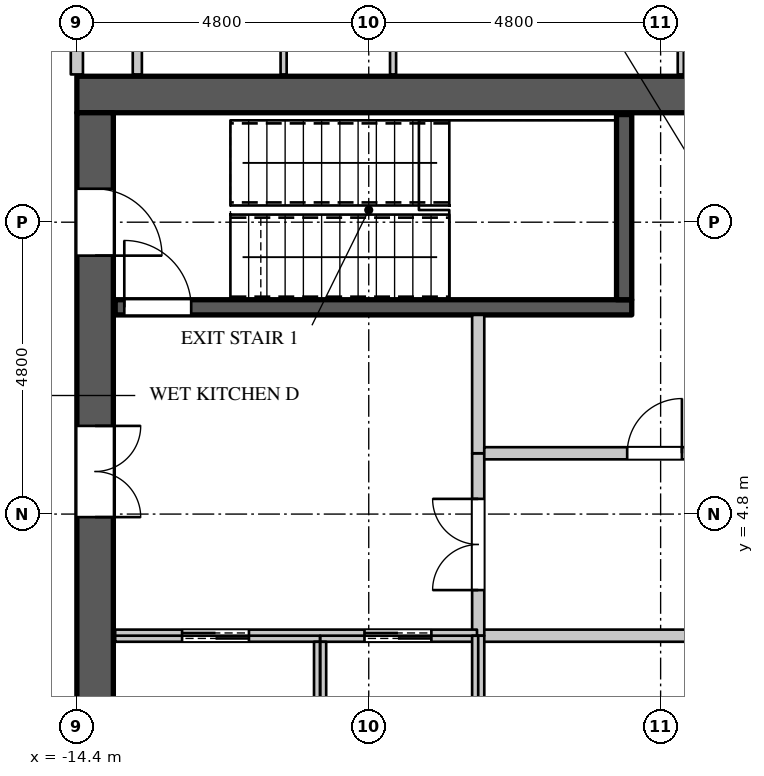
"""IFC4 building model, lengths in metres.
Left out: names, types, materials, properties, quantities, classifications, styles, units other than length and angle.
Written with IfcOpenShell. Run it as: python <this file> out.ifc"""

import sys

from ifc_helpers import new_model, si_unit, direction, frame, frame_2d, origin, place, context, subcontext, project, spatial, rectangle, extrude, element, fill, save


model = new_model("IFC4")
c1 = context("Model", 3, precision=1e-05, world=origin(), true_north=direction((0.0, 1.0)))
c2 = subcontext(c1, "Body", "Model", "MODEL_VIEW")
j1 = project(units=[si_unit("LENGTHUNIT", "METRE"), si_unit("PLANEANGLEUNIT", "RADIAN")], contexts=[c1])
p1 = place(None, origin())
s1 = spatial("IfcSite", under=j1, at=p1, CompositionType="ELEMENT")
p2 = place(p1, origin())
s2 = spatial("IfcBuilding", under=s1, at=p2, CompositionType="ELEMENT")
p3 = place(p2, frame((0.0, 0.0, 281.1)))
s3 = spatial("IfcBuildingStorey", under=s2, at=p3, CompositionType="ELEMENT", Elevation=281.1)
p4 = place(p3, frame((-14.4, 11.7, 0.0), z_axis=(0.0, 0.0, 1.0), x_axis=(1.0, 0.0, 0.0)))
e1 = element("IfcWall", 1, at=p4, inside=s3, PredefinedType="SHEAR", context=c2, shape_type="SweptSolid", body=[
    extrude(rectangle(XDim=28.8, YDim=0.6, at=frame_2d((14.4, 0.0))), origin(), (0.0, 0.0, 1.0), 4.2),
])
p5 = place(p3, frame((-14.1, -11.4, 0.0), z_axis=(0.0, 0.0, 1.0), x_axis=(0.0, 1.0, 0.0)))
e2 = element("IfcWall", 2, at=p5, inside=s3, PredefinedType="SHEAR", context=c2, shape_type="SweptSolid", body=[
    extrude(rectangle(XDim=22.8, YDim=0.6, at=frame_2d((11.4, 0.0))), origin(), (0.0, 0.0, 1.0), 4.2),
])
p6 = place(p5, frame((20.45, 0.0, 0.0)))
e3 = element("IfcOpeningElement", 3, at=p6, cuts=e2, PredefinedType="OPENING", context=c2, shape_type="SweptSolid", body=[
    extrude(rectangle(XDim=1.1, YDim=2.2, at=frame_2d((0.55, 1.1))), frame((0.0, 0.31, 0.0), z_axis=(0.0, -1.0, 0.0), x_axis=(1.0, 0.0, 0.0)), (0.0, 0.0, 1.0), 0.62),
])
p7 = place(p5, frame((1.25, 0.0, 0.0)))
e4 = element("IfcOpeningElement", 4, at=p7, cuts=e2, PredefinedType="OPENING", context=c2, shape_type="SweptSolid", body=[
    extrude(rectangle(XDim=1.1, YDim=2.2, at=frame_2d((0.55, 1.1))), frame((0.0, 0.31, 0.0), z_axis=(0.0, -1.0, 0.0), x_axis=(1.0, 0.0, 0.0)), (0.0, 0.0, 1.0), 0.62),
])
p8 = place(p5, frame((16.15, 0.0, 0.0)))
e5 = element("IfcOpeningElement", 5, at=p8, cuts=e2, PredefinedType="OPENING", context=c2, shape_type="SweptSolid", body=[
    extrude(rectangle(XDim=1.5, YDim=2.4, at=frame_2d((0.75, 1.2))), frame((0.0, 0.31, 0.0), z_axis=(0.0, -1.0, 0.0), x_axis=(1.0, 0.0, 0.0)), (0.0, 0.0, 1.0), 0.62),
])
p9 = place(p5, frame((5.15, 0.0, 0.0)))
e6 = element("IfcOpeningElement", 6, at=p9, cuts=e2, PredefinedType="OPENING", context=c2, shape_type="SweptSolid", body=[
    extrude(rectangle(XDim=1.5, YDim=2.4, at=frame_2d((0.75, 1.2))), frame((0.0, 0.31, 0.0), z_axis=(0.0, -1.0, 0.0), x_axis=(1.0, 0.0, 0.0)), (0.0, 0.0, 1.0), 0.62),
])
p10 = place(p3, frame((-14.4, 12.03, 0.0), z_axis=(0.0, 0.0, 1.0), x_axis=(0.0, 1.0, 0.0)))
e7 = element("IfcWall", 7, at=p10, inside=s3, PredefinedType="PARTITIONING", context=c2, shape_type="SweptSolid", body=[
    extrude(rectangle(XDim=2.27, YDim=0.2, at=frame_2d((1.135, 0.0))), origin(), (0.0, 0.0, 1.0), 3.95),
])
p11 = place(p3, frame((-7.82, 2.8, 0.0), z_axis=(0.0, 0.0, 1.0), x_axis=(1.0, 0.0, 0.0)))
e8 = element("IfcWall", 8, at=p11, inside=s3, PredefinedType="PARTITIONING", context=c2, shape_type="SweptSolid", body=[
    extrude(rectangle(XDim=18.24, YDim=0.2, at=frame_2d((9.12, 0.0))), origin(), (0.0, 0.0, 1.0), 3.95),
])
p12 = place(p11, frame((3.75, 0.0, 0.0)))
e9 = element("IfcOpeningElement", 9, at=p12, cuts=e8, PredefinedType="OPENING", context=c2, shape_type="SweptSolid", body=[
    extrude(rectangle(XDim=0.9, YDim=2.2, at=frame_2d((0.45, 1.1))), frame((0.0, 0.11, 0.0), z_axis=(0.0, -1.0, 0.0), x_axis=(1.0, 0.0, 0.0)), (0.0, 0.0, 1.0), 0.22),
])
p13 = place(p11, frame((12.7, 0.0, 0.0)))
e10 = element("IfcOpeningElement", 10, at=p13, cuts=e8, PredefinedType="OPENING", context=c2, shape_type="SweptSolid", body=[
    extrude(rectangle(XDim=0.9, YDim=2.2, at=frame_2d((0.45, 1.1))), frame((0.0, 0.11, 0.0), z_axis=(0.0, -1.0, 0.0), x_axis=(1.0, 0.0, 0.0)), (0.0, 0.0, 1.0), 0.22),
])
p14 = place(p3, frame((-7.8, 2.8, 0.0), z_axis=(0.0, 0.0, 1.0), x_axis=(0.0, 1.0, 0.0)))
e11 = element("IfcWall", 11, at=p14, inside=s3, PredefinedType="PARTITIONING", context=c2, shape_type="SweptSolid", body=[
    extrude(rectangle(XDim=3.0, YDim=0.2, at=frame_2d((1.5, 0.0))), origin(), (0.0, 0.0, 1.0), 3.95),
])
p15 = place(p14, frame((0.75, 0.0, 0.0)))
e12 = element("IfcOpeningElement", 12, at=p15, cuts=e11, PredefinedType="OPENING", context=c2, shape_type="SweptSolid", body=[
    extrude(rectangle(XDim=1.5, YDim=2.4, at=frame_2d((0.75, 1.2))), frame((0.0, 0.11, 0.0), z_axis=(0.0, -1.0, 0.0), x_axis=(1.0, 0.0, 0.0)), (0.0, 0.0, 1.0), 0.22),
])
p16 = place(p3, frame((-13.406, 12.03, 0.0), z_axis=(0.0, 0.0, 1.0), x_axis=(0.0, 1.0, 0.0)))
e13 = element("IfcWall", 13, at=p16, inside=s3, PredefinedType="PARTITIONING", context=c2, shape_type="SweptSolid", body=[
    extrude(rectangle(XDim=13.701, YDim=0.15, at=frame_2d((6.851, 0.0))), origin(), (0.0, 0.0, 1.0), 3.3),
])
p17 = place(p16, frame((2.5, 0.0, 0.0)))
e14 = element("IfcOpeningElement", 14, at=p17, cuts=e13, PredefinedType="OPENING", context=c2, shape_type="SweptSolid", body=[
    extrude(rectangle(XDim=1.5, YDim=2.2, at=frame_2d((0.75, 1.1))), frame((0.0, 0.085, 0.0), z_axis=(0.0, -1.0, 0.0), x_axis=(1.0, 0.0, 0.0)), (0.0, 0.0, 1.0), 0.17),
])
p18 = place(p3, frame((-7.8, 5.8, 0.0), z_axis=(0.0, 0.0, 1.0), x_axis=(0.0, 1.0, 0.0)))
e15 = element("IfcWall", 15, at=p18, inside=s3, PredefinedType="PARTITIONING", context=c2, shape_type="SweptSolid", body=[
    extrude(rectangle(XDim=2.275, YDim=0.2, at=frame_2d((1.137, 0.0))), origin(), (0.0, 0.0, 1.0), 3.95),
])
p19 = place(p3, frame((-7.7, 5.8, 0.0), z_axis=(0.0, 0.0, 1.0), x_axis=(1.0, 0.0, 0.0)))
e16 = element("IfcWall", 16, at=p19, inside=s3, PredefinedType="PARTITIONING", context=c2, shape_type="SweptSolid", body=[
    extrude(rectangle(XDim=12.52, YDim=0.2, at=frame_2d((6.26, 0.0))), origin(), (0.0, 0.0, 1.0), 3.95),
])
p20 = place(p19, frame((2.35, 0.0, 0.0)))
e17 = element("IfcOpeningElement", 17, at=p20, cuts=e16, PredefinedType="OPENING", context=c2, shape_type="SweptSolid", body=[
    extrude(rectangle(XDim=0.9, YDim=2.2, at=frame_2d((0.45, 1.1))), frame((0.0, 0.11, 0.0), z_axis=(0.0, -1.0, 0.0), x_axis=(1.0, 0.0, 0.0)), (0.0, 0.0, 1.0), 0.22),
])
p21 = place(p19, frame((8.5, 0.0, 0.0)))
e18 = element("IfcOpeningElement", 18, at=p21, cuts=e16, PredefinedType="OPENING", context=c2, shape_type="SweptSolid", body=[
    extrude(rectangle(XDim=0.9, YDim=2.2, at=frame_2d((0.45, 1.1))), frame((0.0, 0.11, 0.0), z_axis=(0.0, -1.0, 0.0), x_axis=(1.0, 0.0, 0.0)), (0.0, 0.0, 1.0), 0.22),
])
p22 = place(p3, frame((-13.77, 2.8, 0.0), z_axis=(0.0, 0.0, 1.0), x_axis=(1.0, 0.0, 0.0)))
e19 = element("IfcWall", 19, at=p22, inside=s3, PredefinedType="PARTITIONING", context=c2, shape_type="SweptSolid", body=[
    extrude(rectangle(XDim=5.95, YDim=0.2, at=frame_2d((2.975, 0.0))), origin(), (0.0, 0.0, 1.0), 3.95),
])
p23 = place(p22, frame((1.1, 0.0, 0.0)))
e20 = element("IfcOpeningElement", 20, at=p23, cuts=e19, PredefinedType="OPENING", context=c2, shape_type="SweptSolid", body=[
    extrude(rectangle(XDim=1.1, YDim=2.2, at=frame_2d((0.55, 1.1))), frame((0.0, 0.11, 0.0), z_axis=(0.0, -1.0, 0.0), x_axis=(1.0, 0.0, 0.0)), (0.0, 0.0, 1.0), 0.22),
])
p24 = place(p22, frame((4.1, 0.0, 0.0)))
e21 = element("IfcOpeningElement", 21, at=p24, cuts=e19, PredefinedType="OPENING", context=c2, shape_type="SweptSolid", body=[
    extrude(rectangle(XDim=1.1, YDim=2.2, at=frame_2d((0.55, 1.1))), frame((0.0, 0.11, 0.0), z_axis=(0.0, -1.0, 0.0), x_axis=(1.0, 0.0, 0.0)), (0.0, 0.0, 1.0), 0.22),
])
p25 = place(p3, frame((-10.4, 0.0, 0.0), z_axis=(0.0, 0.0, 1.0), x_axis=(0.0, 1.0, 0.0)))
e22 = element("IfcWall", 22, at=p25, inside=s3, PredefinedType="PARTITIONING", context=c2, shape_type="SweptSolid", body=[
    extrude(rectangle(XDim=2.7, YDim=0.2, at=frame_2d((1.35, 0.0))), origin(), (0.0, 0.0, 1.0), 3.95),
])
p26 = place(p3, frame((-7.8, 0.0, 0.0), z_axis=(0.0, 0.0, 1.0), x_axis=(0.0, 1.0, 0.0)))
e23 = element("IfcWall", 23, at=p26, inside=s3, PredefinedType="PARTITIONING", context=c2, shape_type="SweptSolid", body=[
    extrude(rectangle(XDim=2.8, YDim=0.2, at=frame_2d((1.4, 0.0))), origin(), (0.0, 0.0, 1.0), 3.95),
])
p27 = place(p3, frame((-13.77, 8.2, 0.0), z_axis=(0.0, 0.0, 1.0), x_axis=(1.0, 0.0, 0.0)))
e24 = element("IfcWall", 24, at=p27, inside=s3, PredefinedType="SHEAR", context=c2, shape_type="SweptSolid", body=[
    extrude(rectangle(XDim=8.495, YDim=0.25, at=frame_2d((4.248, 0.0))), origin(), (0.0, 0.0, 1.0), 3.95),
])
p28 = place(p27, frame((0.15, 0.0, 0.0)))
e25 = element("IfcOpeningElement", 25, at=p28, cuts=e24, PredefinedType="OPENING", context=c2, shape_type="SweptSolid", body=[
    extrude(rectangle(XDim=1.1, YDim=2.2, at=frame_2d((0.55, 1.1))), frame((0.0, 0.135, 0.0), z_axis=(0.0, -1.0, 0.0), x_axis=(1.0, 0.0, 0.0)), (0.0, 0.0, 1.0), 0.27),
])
p29 = place(p3, frame((-5.4, 8.325, 0.0), z_axis=(0.0, 0.0, 1.0), x_axis=(0.0, 1.0, 0.0)))
e26 = element("IfcWall", 26, at=p29, inside=s3, PredefinedType="SHEAR", context=c2, shape_type="SweptSolid", body=[
    extrude(rectangle(XDim=3.045, YDim=0.25, at=frame_2d((1.522, 0.0))), origin(), (0.0, 0.0, 1.0), 3.95),
])
p30 = place(p3, frame((-11.0, 12.03, 0.0), z_axis=(0.0, 0.0, 1.0), x_axis=(0.0, 1.0, 0.0)))
e27 = element("IfcWall", 27, at=p30, inside=s3, PredefinedType="PARTITIONING", context=c2, shape_type="SweptSolid", body=[
    extrude(rectangle(XDim=6.795, YDim=0.1, at=frame_2d((3.397, 0.0))), origin(), (0.0, 0.0, 1.0), 3.95),
])
p31 = place(p30, frame((2.95, 0.0, 0.0)))
e28 = element("IfcOpeningElement", 28, at=p31, cuts=e27, PredefinedType="OPENING", context=c2, shape_type="SweptSolid", body=[
    extrude(rectangle(XDim=0.9, YDim=2.2, at=frame_2d((0.45, 1.1))), frame((0.0, 0.06, 0.0), z_axis=(0.0, -1.0, 0.0), x_axis=(1.0, 0.0, 0.0)), (0.0, 0.0, 1.0), 0.12),
])
p32 = place(p3, frame((-9.2, 12.03, 0.0), z_axis=(0.0, 0.0, 1.0), x_axis=(0.0, 1.0, 0.0)))
e29 = element("IfcWall", 29, at=p32, inside=s3, PredefinedType="PARTITIONING", context=c2, shape_type="SweptSolid", body=[
    extrude(rectangle(XDim=6.795, YDim=0.1, at=frame_2d((3.397, 0.0))), origin(), (0.0, 0.0, 1.0), 3.95),
])
p33 = place(p3, frame((-4.469, 12.03, 0.0), z_axis=(0.0, 0.0, 1.0), x_axis=(0.0, 1.0, 0.0)))
e30 = element("IfcWall", 30, at=p33, inside=s3, PredefinedType="PARTITIONING", context=c2, shape_type="SweptSolid", body=[
    extrude(rectangle(XDim=6.35, YDim=0.1, at=frame_2d((3.175, 0.0))), origin(), (0.0, 0.0, 1.0), 3.3),
])
p34 = place(p20, origin())
e31 = element("IfcDoor", 31, at=p34, inside=s3, OperationType="SINGLE_SWING_RIGHT", PredefinedType="DOOR", context=c2, shape_type="SweptSolid", body=[
    extrude(rectangle(XDim=0.9, YDim=2.2, at=frame_2d((0.45, 1.1))), frame((0.0, 0.025, 0.0), z_axis=(0.0, -1.0, 0.0), x_axis=(1.0, 0.0, 0.0)), (0.0, 0.0, 1.0), 0.05),
])
fill(e17, e31)
p35 = place(p23, origin())
e32 = element("IfcDoor", 32, at=p35, inside=s3, OperationType="DOUBLE_DOOR_SLIDING", PredefinedType="DOOR", context=c2, shape_type="SweptSolid", body=[
    extrude(rectangle(XDim=1.1, YDim=2.2, at=frame_2d((0.55, 1.1))), frame((0.0, 0.025, 0.0), z_axis=(0.0, -1.0, 0.0), x_axis=(1.0, 0.0, 0.0)), (0.0, 0.0, 1.0), 0.05),
])
fill(e20, e32)
p36 = place(p24, origin())
e33 = element("IfcDoor", 33, at=p36, inside=s3, OperationType="DOUBLE_DOOR_SLIDING", PredefinedType="DOOR", context=c2, shape_type="SweptSolid", body=[
    extrude(rectangle(XDim=1.1, YDim=2.2, at=frame_2d((0.55, 1.1))), frame((0.0, 0.025, 0.0), z_axis=(0.0, -1.0, 0.0), x_axis=(1.0, 0.0, 0.0)), (0.0, 0.0, 1.0), 0.05),
])
fill(e21, e33)
p37 = place(p28, origin())
e34 = element("IfcDoor", 34, at=p37, inside=s3, OperationType="SINGLE_SWING_LEFT", PredefinedType="DOOR", context=c2, shape_type="SweptSolid", body=[
    extrude(rectangle(XDim=1.1, YDim=2.2, at=frame_2d((0.55, 1.1))), frame((0.0, 0.025, 0.0), z_axis=(0.0, -1.0, 0.0), x_axis=(1.0, 0.0, 0.0)), (0.0, 0.0, 1.0), 0.05),
])
fill(e25, e34)
p38 = place(p15, origin())
e35 = element("IfcDoor", 35, at=p38, inside=s3, OperationType="DOUBLE_DOOR_SINGLE_SWING", PredefinedType="DOOR", context=c2, shape_type="SweptSolid", body=[
    extrude(rectangle(XDim=1.5, YDim=2.4, at=frame_2d((0.75, 1.2))), frame((0.0, 0.025, 0.0), z_axis=(0.0, -1.0, 0.0), x_axis=(1.0, 0.0, 0.0)), (0.0, 0.0, 1.0), 0.05),
])
fill(e12, e35)
p39 = place(p6, origin())
e36 = element("IfcDoor", 36, at=p39, inside=s3, OperationType="SINGLE_SWING_RIGHT", PredefinedType="DOOR", context=c2, shape_type="SweptSolid", body=[
    extrude(rectangle(XDim=1.1, YDim=2.2, at=frame_2d((0.55, 1.1))), frame((0.0, -0.245, 0.0), z_axis=(0.0, -1.0, 0.0), x_axis=(1.0, 0.0, 0.0)), (0.0, 0.0, 1.0), 0.05),
])
fill(e3, e36)
p40 = place(p8, origin())
e37 = element("IfcDoor", 37, at=p40, inside=s3, OperationType="DOUBLE_DOOR_SINGLE_SWING", PredefinedType="DOOR", context=c2, shape_type="SweptSolid", body=[
    extrude(rectangle(XDim=1.5, YDim=2.4, at=frame_2d((0.75, 1.2))), frame((0.0, -0.245, 0.0), z_axis=(0.0, -1.0, 0.0), x_axis=(1.0, 0.0, 0.0)), (0.0, 0.0, 1.0), 0.05),
])
fill(e5, e37)
save(model, sys.argv[1])
